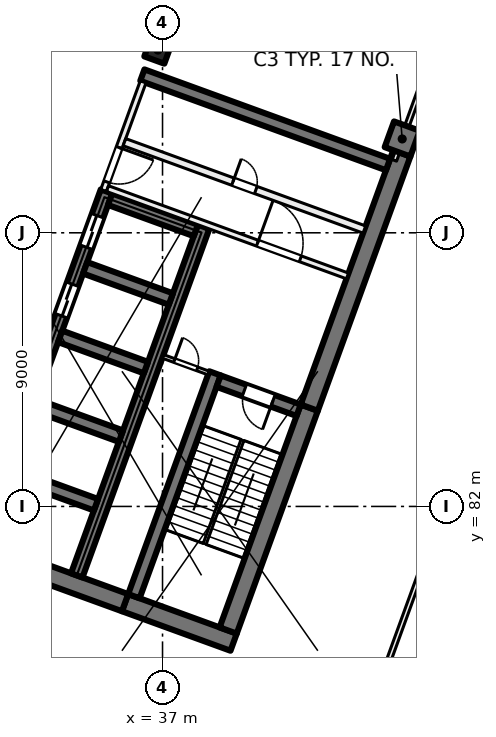
"""IFC4 building model, lengths in metres.
Left out: names, types, materials, properties, quantities, classifications, styles, units other than length and angle.
Written with IfcOpenShell. Run it as: python <this file> out.ifc"""

import sys

from ifc_helpers import new_model, si_unit, direction, frame, frame_2d, origin, origin_2d, place, context, subcontext, project, spatial, rectangle, extrude, element, fill, save


model = new_model("IFC4")
c1 = context("Model", 3, precision=1e-05, world=origin(), true_north=direction((0.0, 1.0)))
c2 = subcontext(c1, "Body", "Model", "MODEL_VIEW")
j1 = project(units=[si_unit("LENGTHUNIT", "METRE"), si_unit("PLANEANGLEUNIT", "RADIAN")], contexts=[c1])
p1 = place(None, origin())
s1 = spatial("IfcSite", under=j1, at=p1, CompositionType="ELEMENT")
p2 = place(p1, origin())
s2 = spatial("IfcBuilding", under=s1, at=p2, CompositionType="ELEMENT")
p3 = place(p2, frame((0.0, 0.0, 22.5)))
s3 = spatial("IfcBuildingStorey", under=s2, at=p3, CompositionType="ELEMENT", Elevation=22.5)
p4 = place(p3, frame((36.849, 97.011, 0.0), z_axis=(0.0, 0.0, 1.0), x_axis=(-0.342020143326, -0.939692620786, 0.0)))
e1 = element("IfcColumn", 1, at=p4, inside=s3, PredefinedType="COLUMN", context=c2, shape_type="SweptSolid", body=[
    extrude(rectangle(XDim=0.7, YDim=0.7, at=origin_2d()), origin(), (0.0, 0.0, 1.0), 5.0),
])
p5 = place(p3, frame((44.884, 94.087, 0.0), z_axis=(0.0, 0.0, 1.0), x_axis=(-0.342020143326, -0.939692620786, 0.0)))
e2 = element("IfcColumn", 2, at=p5, inside=s3, PredefinedType="COLUMN", context=c2, shape_type="SweptSolid", body=[
    extrude(rectangle(XDim=0.9, YDim=0.9, at=origin_2d()), origin(), (0.0, 0.0, 1.0), 5.0),
])
p6 = place(p3, frame((39.338, 77.535, 0.0), z_axis=(0.0, 0.0, 1.0), x_axis=(-0.939701471648, 0.341995824804, 0.0)))
e3 = element("IfcWall", 3, at=p6, inside=s3, PredefinedType="SHEAR", context=c2, shape_type="SweptSolid", body=[
    extrude(rectangle(XDim=3.8, YDim=0.6, at=frame_2d((1.9, 0.0))), origin(), (0.0, 0.0, 1.0), 5.0),
])
p7 = place(p3, frame((35.767, 78.835, 0.0), z_axis=(0.0, 0.0, 1.0), x_axis=(-0.939692894512, 0.342019391267, 0.0)))
e4 = element("IfcWall", 4, at=p7, inside=s3, PredefinedType="SHEAR", context=c2, shape_type="SweptSolid", body=[
    extrude(rectangle(XDim=14.4, YDim=0.6, at=frame_2d((7.2, 0.0))), origin(), (0.0, 0.0, 1.0), 5.0),
])
p8 = place(p3, frame((39.159, 77.92, 0.0), z_axis=(0.0, 0.0, 1.0), x_axis=(0.342016982193, 0.939693771338, 0.0)))
e5 = element("IfcWall", 5, at=p8, inside=s3, PredefinedType="SHEAR", context=c2, shape_type="SweptSolid", body=[
    extrude(rectangle(XDim=7.8, YDim=0.6, at=frame_2d((3.9, 0.0))), origin(), (0.0, 0.0, 1.0), 5.0),
])
p9 = place(p3, frame((41.827, 85.249, 0.0), z_axis=(0.0, 0.0, 1.0), x_axis=(0.342016162452, 0.939694069696, 0.0)))
e6 = element("IfcWall", 6, at=p9, inside=s3, PredefinedType="SHEAR", context=c2, shape_type="SweptSolid", body=[
    extrude(rectangle(XDim=8.9, YDim=0.6, at=frame_2d((4.45, 0.0))), origin(), (0.0, 0.0, 1.0), 5.0),
])
p10 = place(p3, frame((36.058, 79.048, 0.0), z_axis=(0.0, 0.0, 1.0), x_axis=(0.342016982193, 0.939693771338, 0.0)))
e7 = element("IfcWall", 7, at=p10, inside=s3, PredefinedType="SHEAR", context=c2, shape_type="SweptSolid", body=[
    extrude(rectangle(XDim=7.8, YDim=0.4, at=frame_2d((3.9, 0.0))), origin(), (0.0, 0.0, 1.0), 5.0),
])
p11 = place(p3, frame((41.476, 85.164, 0.0), z_axis=(0.0, 0.0, 1.0), x_axis=(-0.939678810556, 0.342058084236, 0.0)))
e8 = element("IfcWall", 8, at=p11, inside=s3, PredefinedType="SHEAR", context=c2, shape_type="SweptSolid", body=[
    extrude(rectangle(XDim=2.8, YDim=0.4, at=frame_2d((1.4, 0.0))), origin(), (0.0, 0.0, 1.0), 5.0),
])
p12 = place(p11, frame((0.9, 0.0, 0.0)))
e9 = element("IfcOpeningElement", 9, at=p12, cuts=e8, PredefinedType="OPENING", context=c2, shape_type="SweptSolid", body=[
    extrude(rectangle(XDim=1.0, YDim=2.1, at=frame_2d((0.5, 1.05))), frame((0.0, 0.21, 0.0), z_axis=(0.0, -1.0, 0.0), x_axis=(1.0, 0.0, 0.0)), (0.0, 0.0, 1.0), 0.42),
])
p13 = place(p3, frame((30.984, 80.895, 0.0), z_axis=(0.0, 0.0, 1.0), x_axis=(0.342021021735, 0.939692301071, 0.0)))
e10 = element("IfcWall", 10, at=p13, inside=s3, PredefinedType="SHEAR", context=c2, shape_type="SweptSolid", body=[
    extrude(rectangle(XDim=12.2, YDim=0.4, at=frame_2d((6.1, 0.0))), origin(), (0.0, 0.0, 1.0), 5.0),
])
p14 = place(p13, frame((5.45, 0.0, 0.0)))
e11 = element("IfcOpeningElement", 11, at=p14, cuts=e10, PredefinedType="OPENING", context=c2, shape_type="SweptSolid", body=[
    extrude(rectangle(XDim=1.1, YDim=2.1, at=frame_2d((0.55, 1.05))), frame((0.0, 0.21, 0.0), z_axis=(0.0, -1.0, 0.0), x_axis=(1.0, 0.0, 0.0)), (0.0, 0.0, 1.0), 0.42),
])
p15 = place(p13, frame((7.85, 0.0, 0.0)))
e12 = element("IfcOpeningElement", 12, at=p15, cuts=e10, PredefinedType="OPENING", context=c2, shape_type="SweptSolid", body=[
    extrude(rectangle(XDim=1.1, YDim=2.1, at=frame_2d((0.55, 1.05))), frame((0.0, 0.21, 0.0), z_axis=(0.0, -1.0, 0.0), x_axis=(1.0, 0.0, 0.0)), (0.0, 0.0, 1.0), 0.42),
])
p16 = place(p13, frame((10.25, 0.0, 0.0)))
e13 = element("IfcOpeningElement", 13, at=p16, cuts=e10, PredefinedType="OPENING", context=c2, shape_type="SweptSolid", body=[
    extrude(rectangle(XDim=1.1, YDim=2.1, at=frame_2d((0.55, 1.05))), frame((0.0, 0.21, 0.0), z_axis=(0.0, -1.0, 0.0), x_axis=(1.0, 0.0, 0.0)), (0.0, 0.0, 1.0), 0.42),
])
p17 = place(p3, frame((34.178, 79.732, 0.0), z_axis=(0.0, 0.0, 1.0), x_axis=(0.342014590177, 0.939694641948, 0.0)))
e14 = element("IfcWall", 14, at=p17, inside=s3, PredefinedType="SHEAR", context=c2, shape_type="SweptSolid", body=[
    extrude(rectangle(XDim=12.2, YDim=0.4, at=frame_2d((6.1, 0.0))), origin(), (0.0, 0.0, 1.0), 5.0),
])
for number, where, z_axis, x_axis in (
    (15, (34.812, 82.056, 0.0), (0.0, 0.0, 1.0), (-0.94, 0.342, 0.0)),
    (16, (35.632, 84.311, 0.0), (0.0, 0.0, 1.0), (-0.94, 0.342, 0.0)),
    (17, (36.453, 86.566, 0.0), (0.0, 0.0, 1.0), (-0.94, 0.342, 0.0)),
    (18, (37.274, 88.822, 0.0), (0.0, 0.0, 1.0), (-0.94, 0.342, 0.0)),
):
    element("IfcWall", number, at=place(p3, frame(where, z_axis=z_axis, x_axis=x_axis)), inside=s3, PredefinedType="SHEAR", context=c2, shape_type="SweptSolid", body=[
        extrude(rectangle(XDim=3.0, YDim=0.4, at=frame_2d((1.5, 0.0))), origin(), (0.0, 0.0, 1.0), 5.0),
    ])
p18 = place(p3, frame((38.095, 91.077, 0.0), z_axis=(0.0, 0.0, 1.0), x_axis=(-0.939676934218, 0.342063238742, 0.0)))
e19 = element("IfcWall", 19, at=p18, inside=s3, PredefinedType="SHEAR", context=c2, shape_type="SweptSolid", body=[
    extrude(rectangle(XDim=3.0, YDim=0.4, at=frame_2d((1.5, 0.0))), origin(), (0.0, 0.0, 1.0), 5.0),
])
p19 = place(p3, frame((44.418, 93.245, 0.0), z_axis=(0.0, 0.0, 1.0), x_axis=(-0.93969060187, 0.342025690201, 0.0)))
e20 = element("IfcWall", 20, at=p19, inside=s3, PredefinedType="SHEAR", context=c2, shape_type="SweptSolid", body=[
    extrude(rectangle(XDim=8.6, YDim=0.4, at=frame_2d((4.3, 0.0))), origin(), (0.0, 0.0, 1.0), 5.0),
])
p20 = place(p3, frame((36.362, 95.964, 0.0), z_axis=(0.0, 0.0, 1.0), x_axis=(-0.341995824804, -0.939701471648, 0.0)))
e21 = element("IfcWall", 21, at=p20, inside=s3, PredefinedType="PARTITIONING", context=c2, shape_type="SweptSolid", body=[
    extrude(rectangle(XDim=3.8, YDim=0.2, at=frame_2d((1.9, 0.0))), origin(), (0.0, 0.0, 1.0), 4.625),
])
p21 = place(p20, frame((2.3, 0.0, 0.0)))
e22 = element("IfcOpeningElement", 22, at=p21, cuts=e21, PredefinedType="OPENING", context=c2, shape_type="SweptSolid", body=[
    extrude(rectangle(XDim=1.2, YDim=2.1, at=frame_2d((0.6, 1.05))), frame((0.0, 0.11, 0.0), z_axis=(0.0, -1.0, 0.0), x_axis=(1.0, 0.0, 0.0)), (0.0, 0.0, 1.0), 0.22),
])
p22 = place(p3, frame((35.19, 92.453, 0.0), z_axis=(0.0, 0.0, 1.0), x_axis=(0.939691552312, -0.342023078919, 0.0)))
e23 = element("IfcWall", 23, at=p22, inside=s3, PredefinedType="PARTITIONING", context=c2, shape_type="SweptSolid", body=[
    extrude(rectangle(XDim=8.4, YDim=0.2, at=frame_2d((4.2, 0.0))), origin(), (0.0, 0.0, 1.0), 4.625),
])
p23 = place(p22, frame((5.25, 0.0, 0.0)))
e24 = element("IfcOpeningElement", 24, at=p23, cuts=e23, PredefinedType="OPENING", context=c2, shape_type="SweptSolid", body=[
    extrude(rectangle(XDim=1.5, YDim=2.1, at=frame_2d((0.75, 1.05))), frame((0.0, 0.11, 0.0), z_axis=(0.0, -1.0, 0.0), x_axis=(1.0, 0.0, 0.0)), (0.0, 0.0, 1.0), 0.22),
])
p24 = place(p3, frame((35.746, 93.98, 0.0), z_axis=(0.0, 0.0, 1.0), x_axis=(0.939691552312, -0.342023078919, 0.0)))
e25 = element("IfcWall", 25, at=p24, inside=s3, PredefinedType="PARTITIONING", context=c2, shape_type="SweptSolid", body=[
    extrude(rectangle(XDim=8.4, YDim=0.25, at=frame_2d((4.2, 0.0))), origin(), (0.0, 0.0, 1.0), 4.625),
])
p25 = place(p24, frame((3.8, 0.0, 0.0)))
e26 = element("IfcOpeningElement", 26, at=p25, cuts=e25, PredefinedType="OPENING", context=c2, shape_type="SweptSolid", body=[
    extrude(rectangle(XDim=0.8, YDim=2.1, at=frame_2d((0.4, 1.05))), frame((0.0, 0.135, 0.0), z_axis=(0.0, -1.0, 0.0), x_axis=(1.0, 0.0, 0.0)), (0.0, 0.0, 1.0), 0.27),
])
p26 = place(p3, frame((37.013, 86.935, 0.0), z_axis=(0.0, 0.0, 1.0), x_axis=(0.939659694648, -0.342110593602, 0.0)))
e27 = element("IfcWall", 27, at=p26, inside=s3, PredefinedType="PARTITIONING", context=c2, shape_type="SweptSolid", body=[
    extrude(rectangle(XDim=1.6, YDim=0.125, at=frame_2d((0.8, 0.0))), origin(), (0.0, 0.0, 1.0), 4.625),
])
p27 = place(p26, frame((0.4, 0.0, 0.0)))
e28 = element("IfcOpeningElement", 28, at=p27, cuts=e27, PredefinedType="OPENING", context=c2, shape_type="SweptSolid", body=[
    extrude(rectangle(XDim=0.8, YDim=2.1, at=frame_2d((0.4, 1.05))), frame((0.0, 0.073, 0.0), z_axis=(0.0, -1.0, 0.0), x_axis=(1.0, 0.0, 0.0)), (0.0, 0.0, 1.0), 0.145),
])
p28 = place(p3, frame((37.528, 72.554, 0.0), z_axis=(0.0, 0.0, 1.0), x_axis=(-0.939693287343, 0.34201831197, 0.0)))
e29 = element("IfcWall", 29, at=p28, inside=s3, PredefinedType="PARTITIONING", context=c2, shape_type="SweptSolid", body=[
    extrude(rectangle(XDim=22.005, YDim=0.15, at=frame_2d((11.002, 0.0))), origin(), (0.0, 0.0, 1.0), 4.625),
])
p29 = place(p28, frame((16.101, 0.0, 0.0)))
e30 = element("IfcOpeningElement", 30, at=p29, cuts=e29, PredefinedType="OPENING", context=c2, shape_type="SweptSolid", body=[
    extrude(rectangle(XDim=1.0, YDim=2.1, at=frame_2d((0.5, 1.05))), frame((0.0, 0.085, 0.0), z_axis=(0.0, -1.0, 0.0), x_axis=(1.0, 0.0, 0.0)), (0.0, 0.0, 1.0), 0.17),
])
p30 = place(p28, frame((5.105, 0.0, 0.0)))
e31 = element("IfcOpeningElement", 31, at=p30, cuts=e29, PredefinedType="OPENING", context=c2, shape_type="SweptSolid", body=[
    extrude(rectangle(XDim=1.0, YDim=2.1, at=frame_2d((0.5, 1.05))), frame((0.0, 0.085, 0.0), z_axis=(0.0, -1.0, 0.0), x_axis=(1.0, 0.0, 0.0)), (0.0, 0.0, 1.0), 0.17),
])
p31 = place(p3, frame((49.749, 91.52, 0.0), z_axis=(0.0, 0.0, 1.0), x_axis=(-0.342022021776, -0.939691937084, 0.0)))
e32 = element("IfcWall", 32, at=p31, inside=s3, PredefinedType="PARTITIONING", context=c2, shape_type="SweptSolid", body=[
    extrude(rectangle(XDim=17.004, YDim=0.15, at=frame_2d((8.502, 0.0))), origin(), (0.0, 0.0, 1.0), 4.625),
])
p32 = place(p31, frame((5.101, 0.0, 0.0)))
e33 = element("IfcOpeningElement", 33, at=p32, cuts=e32, PredefinedType="OPENING", context=c2, shape_type="SweptSolid", body=[
    extrude(rectangle(XDim=1.0, YDim=2.1, at=frame_2d((0.5, 1.05))), frame((0.0, 0.085, 0.0), z_axis=(0.0, -1.0, 0.0), x_axis=(1.0, 0.0, 0.0)), (0.0, 0.0, 1.0), 0.17),
])
p33 = place(p3, frame((44.627, 93.382, 0.0), z_axis=(0.0, 0.0, 1.0), x_axis=(0.342025351501, 0.939690725149, 0.0)))
e34 = element("IfcWall", 34, at=p33, inside=s3, PredefinedType="PARTITIONING", context=c2, shape_type="SweptSolid", body=[
    extrude(rectangle(XDim=5.0, YDim=0.15, at=frame_2d((2.5, 0.0))), origin(), (0.0, 0.0, 1.0), 4.625),
])
p34 = place(p15, origin())
e35 = element("IfcDoor", 35, at=p34, inside=s3, OperationType="DOUBLE_DOOR_SLIDING", PredefinedType="DOOR", context=c2, shape_type="SweptSolid", body=[
    extrude(rectangle(XDim=1.1, YDim=2.1, at=frame_2d((0.55, 1.05))), frame((0.0, 0.025, 0.0), z_axis=(0.0, -1.0, 0.0), x_axis=(1.0, 0.0, 0.0)), (0.0, 0.0, 1.0), 0.05),
])
fill(e12, e35)
p35 = place(p16, origin())
e36 = element("IfcDoor", 36, at=p35, inside=s3, OperationType="DOUBLE_DOOR_SLIDING", PredefinedType="DOOR", context=c2, shape_type="SweptSolid", body=[
    extrude(rectangle(XDim=1.1, YDim=2.1, at=frame_2d((0.55, 1.05))), frame((0.0, 0.025, 0.0), z_axis=(0.0, -1.0, 0.0), x_axis=(1.0, 0.0, 0.0)), (0.0, 0.0, 1.0), 0.05),
])
fill(e13, e36)
p36 = place(p21, origin())
e37 = element("IfcDoor", 37, at=p36, inside=s3, OperationType="DOUBLE_DOOR_SINGLE_SWING", PredefinedType="DOOR", context=c2, shape_type="SweptSolid", body=[
    extrude(rectangle(XDim=1.2, YDim=2.1, at=frame_2d((0.6, 1.05))), frame((0.0, 0.025, 0.0), z_axis=(0.0, -1.0, 0.0), x_axis=(1.0, 0.0, 0.0)), (0.0, 0.0, 1.0), 0.05),
])
fill(e22, e37)
p37 = place(p23, origin())
e38 = element("IfcDoor", 38, at=p37, inside=s3, OperationType="DOUBLE_DOOR_SINGLE_SWING", PredefinedType="DOOR", context=c2, shape_type="SweptSolid", body=[
    extrude(rectangle(XDim=1.5, YDim=2.1, at=frame_2d((0.75, 1.05))), frame((0.0, 0.025, 0.0), z_axis=(0.0, -1.0, 0.0), x_axis=(1.0, 0.0, 0.0)), (0.0, 0.0, 1.0), 0.05),
])
fill(e24, e38)
p38 = place(p12, origin())
e39 = element("IfcDoor", 39, at=p38, inside=s3, OperationType="SINGLE_SWING_RIGHT", PredefinedType="DOOR", context=c2, shape_type="SweptSolid", body=[
    extrude(rectangle(XDim=1.0, YDim=2.1, at=frame_2d((0.5, 1.05))), frame((0.0, 0.025, 0.0), z_axis=(0.0, -1.0, 0.0), x_axis=(1.0, 0.0, 0.0)), (0.0, 0.0, 1.0), 0.05),
])
fill(e9, e39)
p39 = place(p27, origin())
e40 = element("IfcDoor", 40, at=p39, inside=s3, OperationType="SINGLE_SWING_LEFT", PredefinedType="DOOR", context=c2, shape_type="SweptSolid", body=[
    extrude(rectangle(XDim=0.8, YDim=2.1, at=frame_2d((0.4, 1.05))), frame((0.0, 0.025, 0.0), z_axis=(0.0, -1.0, 0.0), x_axis=(1.0, 0.0, 0.0)), (0.0, 0.0, 1.0), 0.05),
])
fill(e28, e40)
p40 = place(p25, origin())
e41 = element("IfcDoor", 41, at=p40, inside=s3, OperationType="SINGLE_SWING_RIGHT", PredefinedType="DOOR", context=c2, shape_type="SweptSolid", body=[
    extrude(rectangle(XDim=0.8, YDim=2.1, at=frame_2d((0.4, 1.05))), frame((0.0, 0.025, 0.0), z_axis=(0.0, -1.0, 0.0), x_axis=(1.0, 0.0, 0.0)), (0.0, 0.0, 1.0), 0.05),
])
fill(e26, e41)
save(model, sys.argv[1])
